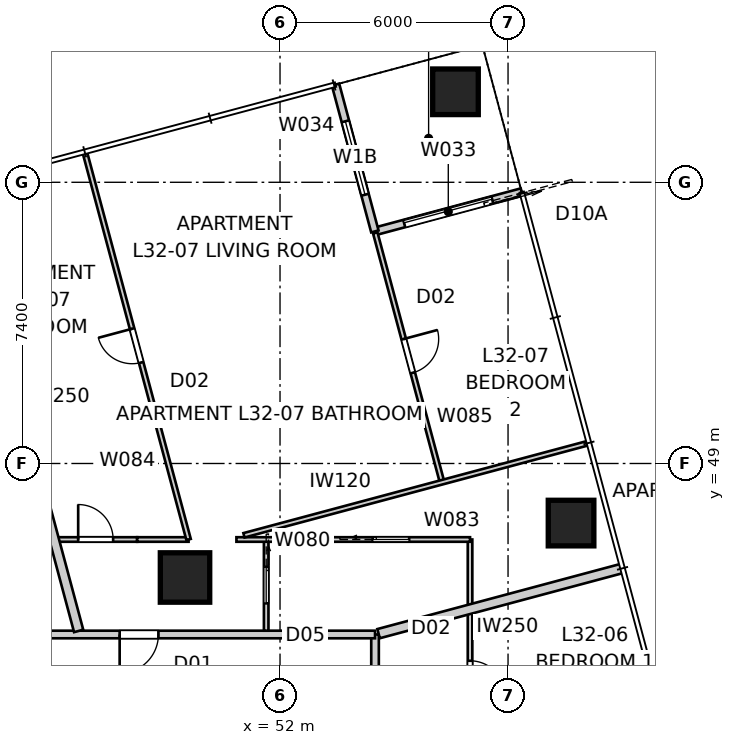
"""IFC4 building model, lengths in metres.
Left out: names, types, materials, properties, quantities, classifications, styles, units other than length and angle.
Written with IfcOpenShell. Run it as: python <this file> out.ifc"""

import sys

from ifc_helpers import new_model, si_unit, direction, frame, frame_2d, origin, origin_2d, place, context, subcontext, project, spatial, rectangle, extrude, element, fill, save


model = new_model("IFC4")
c1 = context("Model", 3, precision=1e-05, world=origin(), true_north=direction((0.0, 1.0)))
c2 = subcontext(c1, "Body", "Model", "MODEL_VIEW")
j1 = project(units=[si_unit("LENGTHUNIT", "METRE"), si_unit("PLANEANGLEUNIT", "RADIAN")], contexts=[c1])
p1 = place(None, origin())
s1 = spatial("IfcSite", under=j1, at=p1, CompositionType="ELEMENT")
p2 = place(p1, origin())
s2 = spatial("IfcBuilding", under=s1, at=p2, CompositionType="ELEMENT")
p3 = place(p2, frame((0.0, 0.0, 118.4)))
s3 = spatial("IfcBuildingStorey", under=s2, at=p3, CompositionType="ELEMENT", Elevation=118.4)
for number, where, z_axis, x_axis in (
    (1, (59.658, 47.432, 0.0), (0.0, 0.0, 1.0), (1.0, 0.0, 0.0)),
    (2, (56.617, 58.781, 0.0), (0.0, 0.0, 1.0), (1.0, 0.0, 0.0)),
):
    element("IfcColumn", number, at=place(p3, frame(where, z_axis=z_axis, x_axis=x_axis)), inside=s3, PredefinedType="COLUMN", context=c2, shape_type="SweptSolid", body=[
        extrude(rectangle(XDim=1.2, YDim=1.2, at=origin_2d()), origin(), (0.0, 0.0, 1.0), 3.4),
    ])
p4 = place(p3, frame((49.5, 46.0, 0.0), z_axis=(0.0, 0.0, 1.0), x_axis=(1.0, 0.0, 0.0)))
e3 = element("IfcColumn", 3, at=p4, inside=s3, PredefinedType="COLUMN", context=c2, shape_type="SweptSolid", body=[
    extrude(rectangle(XDim=1.3, YDim=1.3, at=origin_2d()), origin(), (0.0, 0.0, 1.0), 3.4),
])
p5 = place(p3, frame((58.359, 56.143, 0.0), z_axis=(0.0, 0.0, 1.0), x_axis=(-0.965919172068, -0.258843877716, 0.0)))
e4 = element("IfcWall", 4, at=p5, inside=s3, PredefinedType="SOLIDWALL", context=c2, shape_type="SweptSolid", body=[
    extrude(rectangle(XDim=4.0, YDim=0.2, at=frame_2d((2.0, 0.0))), origin(), (0.0, 0.0, 1.0), 3.25),
])
p6 = place(p5, frame((0.8, 0.0, 0.0)))
e5 = element("IfcOpeningElement", 5, at=p6, cuts=e4, PredefinedType="OPENING", context=c2, shape_type="SweptSolid", body=[
    extrude(rectangle(XDim=2.4, YDim=2.1, at=frame_2d((1.2, 1.05))), frame((0.0, 0.11, 0.0), z_axis=(0.0, -1.0, 0.0), x_axis=(1.0, 0.0, 0.0)), (0.0, 0.0, 1.0), 0.22),
])
p7 = place(p3, frame((54.496, 55.107, 0.0), z_axis=(0.0, 0.0, 1.0), x_axis=(-0.258786931944, 0.965934430412, 0.0)))
e6 = element("IfcWall", 6, at=p7, inside=s3, PredefinedType="SOLIDWALL", context=c2, shape_type="SweptSolid", body=[
    extrude(rectangle(XDim=4.0, YDim=0.2, at=frame_2d((2.0, 0.0))), origin(), (0.0, 0.0, 1.0), 3.25),
])
p8 = place(p7, frame((1.0, 0.0, 0.45)))
e7 = element("IfcOpeningElement", 7, at=p8, cuts=e6, PredefinedType="OPENING", context=c2, shape_type="SweptSolid", body=[
    extrude(rectangle(XDim=2.0, YDim=1.8, at=frame_2d((1.0, 0.9))), frame((0.0, 0.11, 0.0), z_axis=(0.0, -1.0, 0.0), x_axis=(1.0, 0.0, 0.0)), (0.0, 0.0, 1.0), 0.22),
])
p9 = place(p3, frame((54.5, 15.5, 0.0), z_axis=(0.0, 0.0, 1.0), x_axis=(0.0, 1.0, 0.0)))
e8 = element("IfcWall", 8, at=p9, inside=s3, PredefinedType="PARTITIONING", context=c2, shape_type="SweptSolid", body=[
    extrude(rectangle(XDim=29.0, YDim=0.2, at=frame_2d((14.5, 0.0))), origin(), (0.0, 0.0, 1.0), 3.25),
])
p10 = place(p9, frame((24.76, 0.0, 0.0)))
e9 = element("IfcOpeningElement", 9, at=p10, cuts=e8, PredefinedType="OPENING", context=c2, shape_type="SweptSolid", body=[
    extrude(rectangle(XDim=1.02, YDim=2.1, at=frame_2d((0.51, 1.05))), frame((0.0, 0.11, 0.0), z_axis=(0.0, -1.0, 0.0), x_axis=(1.0, 0.0, 0.0)), (0.0, 0.0, 1.0), 0.22),
])
p11 = place(p9, frame((5.829, 0.0, 0.0)))
e10 = element("IfcOpeningElement", 10, at=p11, cuts=e8, PredefinedType="OPENING", context=c2, shape_type="SweptSolid", body=[
    extrude(rectangle(XDim=1.02, YDim=2.34, at=frame_2d((0.51, 1.17))), frame((0.0, 0.11, 0.0), z_axis=(0.0, -1.0, 0.0), x_axis=(1.0, 0.0, 0.0)), (0.0, 0.0, 1.0), 0.22),
])
p12 = place(p9, frame((9.559, 0.0, 0.0)))
e11 = element("IfcOpeningElement", 11, at=p12, cuts=e8, PredefinedType="OPENING", context=c2, shape_type="SweptSolid", body=[
    extrude(rectangle(XDim=1.02, YDim=2.34, at=frame_2d((0.51, 1.17))), frame((0.0, 0.11, 0.0), z_axis=(0.0, -1.0, 0.0), x_axis=(1.0, 0.0, 0.0)), (0.0, 0.0, 1.0), 0.22),
])
p13 = place(p3, frame((54.5, 44.5, 0.0), z_axis=(0.0, 0.0, 1.0), x_axis=(-1.0, 0.0, 0.0)))
e12 = element("IfcWall", 12, at=p13, inside=s3, PredefinedType="PARTITIONING", context=c2, shape_type="SweptSolid", body=[
    extrude(rectangle(XDim=28.2, YDim=0.2, at=frame_2d((14.1, 0.0))), origin(), (0.0, 0.0, 1.0), 3.25),
])
p14 = place(p13, frame((10.837, 0.0, 0.0)))
e13 = element("IfcOpeningElement", 13, at=p14, cuts=e12, PredefinedType="OPENING", context=c2, shape_type="SweptSolid", body=[
    extrude(rectangle(XDim=1.02, YDim=2.34, at=frame_2d((0.51, 1.17))), frame((0.0, 0.11, 0.0), z_axis=(0.0, -1.0, 0.0), x_axis=(1.0, 0.0, 0.0)), (0.0, 0.0, 1.0), 0.22),
])
p15 = place(p13, frame((5.7, 0.0, 0.0)))
e14 = element("IfcOpeningElement", 14, at=p15, cuts=e12, PredefinedType="OPENING", context=c2, shape_type="SweptSolid", body=[
    extrude(rectangle(XDim=1.02, YDim=2.34, at=frame_2d((0.51, 1.17))), frame((0.0, 0.11, 0.0), z_axis=(0.0, -1.0, 0.0), x_axis=(1.0, 0.0, 0.0)), (0.0, 0.0, 1.0), 0.22),
])
p16 = place(p13, frame((26.127, 0.0, 0.0)))
e15 = element("IfcOpeningElement", 15, at=p16, cuts=e12, PredefinedType="OPENING", context=c2, shape_type="SweptSolid", body=[
    extrude(rectangle(XDim=1.02, YDim=2.34, at=frame_2d((0.51, 1.17))), frame((0.0, 0.11, 0.0), z_axis=(0.0, -1.0, 0.0), x_axis=(1.0, 0.0, 0.0)), (0.0, 0.0, 1.0), 0.22),
])
p17 = place(p3, frame((43.56, 56.318, 0.0), z_axis=(0.0, 0.0, 1.0), x_axis=(0.258824223352, -0.965924438766, 0.0)))
e16 = element("IfcWall", 16, at=p17, inside=s3, PredefinedType="PARTITIONING", context=c2, shape_type="SweptSolid", body=[
    extrude(rectangle(XDim=12.138, YDim=0.25, at=frame_2d((6.069, 0.0))), origin(), (0.0, 0.0, 1.0), 3.25),
])
p18 = place(p3, frame((61.012, 46.242, 0.0), z_axis=(0.0, 0.0, 1.0), x_axis=(-0.965929355837, -0.25880587229, 0.0)))
e17 = element("IfcWall", 17, at=p18, inside=s3, PredefinedType="PARTITIONING", context=c2, shape_type="SweptSolid", body=[
    extrude(rectangle(XDim=6.645, YDim=0.25, at=frame_2d((3.322, 0.0))), origin(), (0.0, 0.0, 1.0), 3.25),
])
p19 = place(p3, frame((57.0, 47.0, 0.0), z_axis=(0.0, 0.0, 1.0), x_axis=(0.0, -1.0, 0.0)))
e18 = element("IfcWall", 18, at=p19, inside=s3, PredefinedType="PARTITIONING", context=c2, shape_type="SweptSolid", body=[
    extrude(rectangle(XDim=34.0, YDim=0.12, at=frame_2d((17.0, 0.0))), origin(), (0.0, 0.0, 1.0), 2.55),
])
p20 = place(p19, frame((8.23, 0.0, 0.0)))
e19 = element("IfcOpeningElement", 19, at=p20, cuts=e18, PredefinedType="OPENING", context=c2, shape_type="SweptSolid", body=[
    extrude(rectangle(XDim=0.92, YDim=2.34, at=frame_2d((0.46, 1.17))), frame((0.0, 0.07, 0.0), z_axis=(0.0, -1.0, 0.0), x_axis=(1.0, 0.0, 0.0)), (0.0, 0.0, 1.0), 0.14),
])
p21 = place(p19, frame((3.192, 0.0, 0.0)))
e20 = element("IfcOpeningElement", 20, at=p21, cuts=e18, PredefinedType="OPENING", context=c2, shape_type="SweptSolid", body=[
    extrude(rectangle(XDim=0.92, YDim=2.34, at=frame_2d((0.46, 1.17))), frame((0.0, 0.07, 0.0), z_axis=(0.0, -1.0, 0.0), x_axis=(1.0, 0.0, 0.0)), (0.0, 0.0, 1.0), 0.14),
])
p22 = place(p19, frame((24.391, 0.0, 0.0)))
e21 = element("IfcOpeningElement", 21, at=p22, cuts=e18, PredefinedType="OPENING", context=c2, shape_type="SweptSolid", body=[
    extrude(rectangle(XDim=0.92, YDim=2.34, at=frame_2d((0.46, 1.17))), frame((0.0, 0.07, 0.0), z_axis=(0.0, -1.0, 0.0), x_axis=(1.0, 0.0, 0.0)), (0.0, 0.0, 1.0), 0.14),
])
p23 = place(p19, frame((21.702, 0.0, 0.0)))
e22 = element("IfcOpeningElement", 22, at=p23, cuts=e18, PredefinedType="OPENING", context=c2, shape_type="SweptSolid", body=[
    extrude(rectangle(XDim=0.92, YDim=2.34, at=frame_2d((0.46, 1.17))), frame((0.0, 0.07, 0.0), z_axis=(0.0, -1.0, 0.0), x_axis=(1.0, 0.0, 0.0)), (0.0, 0.0, 1.0), 0.14),
])
p24 = place(p19, frame((31.459, 0.0, 0.0)))
e23 = element("IfcOpeningElement", 23, at=p24, cuts=e18, PredefinedType="OPENING", context=c2, shape_type="SweptSolid", body=[
    extrude(rectangle(XDim=0.96, YDim=2.1, at=frame_2d((0.48, 1.05))), frame((0.0, 0.07, 0.0), z_axis=(0.0, -1.0, 0.0), x_axis=(1.0, 0.0, 0.0)), (0.0, 0.0, 1.0), 0.14),
])
p25 = place(p19, frame((13.759, 0.0, 0.0)))
e24 = element("IfcOpeningElement", 24, at=p25, cuts=e18, PredefinedType="OPENING", context=c2, shape_type="SweptSolid", body=[
    extrude(rectangle(XDim=0.96, YDim=2.1, at=frame_2d((0.48, 1.05))), frame((0.0, 0.07, 0.0), z_axis=(0.0, -1.0, 0.0), x_axis=(1.0, 0.0, 0.0)), (0.0, 0.0, 1.0), 0.14),
])
p26 = place(p3, frame((51.636, 47.0, 0.0), z_axis=(0.0, 0.0, 1.0), x_axis=(0.0, -1.0, 0.0)))
e25 = element("IfcWall", 25, at=p26, inside=s3, PredefinedType="PARTITIONING", context=c2, shape_type="SweptSolid", body=[
    extrude(rectangle(XDim=2.4, YDim=0.12, at=frame_2d((1.2, 0.0))), origin(), (0.0, 0.0, 1.0), 3.25),
])
p27 = place(p26, frame((0.72, 0.0, 0.0)))
e26 = element("IfcOpeningElement", 26, at=p27, cuts=e25, PredefinedType="OPENING", context=c2, shape_type="SweptSolid", body=[
    extrude(rectangle(XDim=0.96, YDim=2.1, at=frame_2d((0.48, 1.05))), frame((0.0, 0.07, 0.0), z_axis=(0.0, -1.0, 0.0), x_axis=(1.0, 0.0, 0.0)), (0.0, 0.0, 1.0), 0.14),
])
p28 = place(p3, frame((23.0, 47.0, 0.0), z_axis=(0.0, 0.0, 1.0), x_axis=(1.0, 0.0, 0.0)))
e27 = element("IfcWall", 27, at=p28, inside=s3, PredefinedType="PARTITIONING", context=c2, shape_type="SweptSolid", body=[
    extrude(rectangle(XDim=25.241, YDim=0.12, at=frame_2d((12.62, 0.0))), origin(), (0.0, 0.0, 1.0), 2.55),
])
p29 = place(p28, frame((21.702, 0.0, 0.0)))
e28 = element("IfcOpeningElement", 28, at=p29, cuts=e27, PredefinedType="OPENING", context=c2, shape_type="SweptSolid", body=[
    extrude(rectangle(XDim=0.92, YDim=2.34, at=frame_2d((0.46, 1.17))), frame((0.0, 0.07, 0.0), z_axis=(0.0, -1.0, 0.0), x_axis=(1.0, 0.0, 0.0)), (0.0, 0.0, 1.0), 0.14),
])
p30 = place(p28, frame((17.598, 0.0, 0.0)))
e29 = element("IfcOpeningElement", 29, at=p30, cuts=e27, PredefinedType="OPENING", context=c2, shape_type="SweptSolid", body=[
    extrude(rectangle(XDim=0.92, YDim=2.34, at=frame_2d((0.46, 1.17))), frame((0.0, 0.07, 0.0), z_axis=(0.0, -1.0, 0.0), x_axis=(1.0, 0.0, 0.0)), (0.0, 0.0, 1.0), 0.14),
])
p31 = place(p28, frame((23.689, 0.0, 0.0)))
e30 = element("IfcOpeningElement", 30, at=p31, cuts=e27, PredefinedType="OPENING", context=c2, shape_type="SweptSolid", body=[
    extrude(rectangle(XDim=0.92, YDim=2.34, at=frame_2d((0.46, 1.17))), frame((0.0, 0.07, 0.0), z_axis=(0.0, -1.0, 0.0), x_axis=(1.0, 0.0, 0.0)), (0.0, 0.0, 1.0), 0.14),
])
p32 = place(p28, frame((2.225, 0.0, 0.0)))
e31 = element("IfcOpeningElement", 31, at=p32, cuts=e27, PredefinedType="OPENING", context=c2, shape_type="SweptSolid", body=[
    extrude(rectangle(XDim=0.92, YDim=2.34, at=frame_2d((0.46, 1.17))), frame((0.0, 0.07, 0.0), z_axis=(0.0, -1.0, 0.0), x_axis=(1.0, 0.0, 0.0)), (0.0, 0.0, 1.0), 0.14),
])
p33 = place(p28, frame((13.709, 0.0, 0.0)))
e32 = element("IfcOpeningElement", 32, at=p33, cuts=e27, PredefinedType="OPENING", context=c2, shape_type="SweptSolid", body=[
    extrude(rectangle(XDim=0.96, YDim=2.1, at=frame_2d((0.48, 1.05))), frame((0.0, 0.07, 0.0), z_axis=(0.0, -1.0, 0.0), x_axis=(1.0, 0.0, 0.0)), (0.0, 0.0, 1.0), 0.14),
])
p34 = place(p3, frame((50.853, 47.0, 0.0), z_axis=(0.0, 0.0, 1.0), x_axis=(1.0, 0.0, 0.0)))
e33 = element("IfcWall", 33, at=p34, inside=s3, PredefinedType="PARTITIONING", context=c2, shape_type="SweptSolid", body=[
    extrude(rectangle(XDim=6.147, YDim=0.12, at=frame_2d((3.074, 0.0))), origin(), (0.0, 0.0, 1.0), 3.25),
])
p35 = place(p34, frame((3.585, 0.0, 0.0)))
e34 = element("IfcOpeningElement", 34, at=p35, cuts=e33, PredefinedType="OPENING", context=c2, shape_type="SweptSolid", body=[
    extrude(rectangle(XDim=0.96, YDim=2.1, at=frame_2d((0.48, 1.05))), frame((0.0, 0.07, 0.0), z_axis=(0.0, -1.0, 0.0), x_axis=(1.0, 0.0, 0.0)), (0.0, 0.0, 1.0), 0.14),
])
p36 = place(p3, frame((49.594, 47.0, 0.0), z_axis=(0.0, 0.0, 1.0), x_axis=(-0.258797552287, 0.965931585015, 0.0)))
e35 = element("IfcWall", 35, at=p36, inside=s3, PredefinedType="PARTITIONING", context=c2, shape_type="SweptSolid", body=[
    extrude(rectangle(XDim=10.522, YDim=0.12, at=frame_2d((5.261, 0.0))), origin(), (0.0, 0.0, 1.0), 2.722),
])
p37 = place(p36, frame((4.821, 0.0, 0.0)))
e36 = element("IfcOpeningElement", 36, at=p37, cuts=e35, PredefinedType="OPENING", context=c2, shape_type="SweptSolid", body=[
    extrude(rectangle(XDim=0.92, YDim=2.34, at=frame_2d((0.46, 1.17))), frame((0.0, 0.07, 0.0), z_axis=(0.0, -1.0, 0.0), x_axis=(1.0, 0.0, 0.0)), (0.0, 0.0, 1.0), 0.14),
])
p38 = place(p3, frame((54.506, 55.069, 0.0), z_axis=(0.0, 0.0, 1.0), x_axis=(0.258830095464, -0.965922865286, 0.0)))
e37 = element("IfcWall", 37, at=p38, inside=s3, PredefinedType="PARTITIONING", context=c2, shape_type="SweptSolid", body=[
    extrude(rectangle(XDim=6.793, YDim=0.12, at=frame_2d((3.396, 0.0))), origin(), (0.0, 0.0, 1.0), 3.25),
])
p39 = place(p38, frame((2.892, 0.0, 0.0)))
e38 = element("IfcOpeningElement", 38, at=p39, cuts=e37, PredefinedType="OPENING", context=c2, shape_type="SweptSolid", body=[
    extrude(rectangle(XDim=0.92, YDim=2.34, at=frame_2d((0.46, 1.17))), frame((0.0, 0.07, 0.0), z_axis=(0.0, -1.0, 0.0), x_axis=(1.0, 0.0, 0.0)), (0.0, 0.0, 1.0), 0.14),
])
p40 = place(p3, frame((60.089, 49.532, 0.0), z_axis=(0.0, 0.0, 1.0), x_axis=(-0.965927203676, -0.25881390457, 0.0)))
e39 = element("IfcWall", 39, at=p40, inside=s3, PredefinedType="PARTITIONING", context=c2, shape_type="SweptSolid", body=[
    extrude(rectangle(XDim=9.357, YDim=0.12, at=frame_2d((4.678, 0.0))), origin(), (0.0, 0.0, 1.0), 2.638),
])
p41 = place(p3, frame((48.241, 47.0, 0.0), z_axis=(0.0, 0.0, 1.0), x_axis=(1.0, 0.0, 0.0)))
e40 = element("IfcWall", 40, at=p41, inside=s3, PredefinedType="PARTITIONING", context=c2, shape_type="SweptSolid", body=[
    extrude(rectangle(XDim=1.353, YDim=0.12, at=frame_2d((0.676, 0.0))), origin(), (0.0, 0.0, 1.0), 3.25),
])
p42 = place(p6, origin())
e41 = element("IfcDoor", 41, at=p42, inside=s3, OperationType="SLIDING_TO_LEFT", PredefinedType="DOOR", context=c2, shape_type="SweptSolid", body=[
    extrude(rectangle(XDim=2.4, YDim=2.1, at=frame_2d((1.2, 1.05))), frame((0.0, 0.025, 0.0), z_axis=(0.0, -1.0, 0.0), x_axis=(1.0, 0.0, 0.0)), (0.0, 0.0, 1.0), 0.05),
])
fill(e5, e41)
p43 = place(p8, origin())
e42 = element("IfcWindow", 42, at=p43, inside=s3, PartitioningType="SINGLE_PANEL", PredefinedType="WINDOW", context=c2, shape_type="SweptSolid", body=[
    extrude(rectangle(XDim=2.0, YDim=1.8, at=frame_2d((1.0, 0.9))), frame((0.0, 0.03, 0.0), z_axis=(0.0, -1.0, 0.0), x_axis=(1.0, 0.0, 0.0)), (0.0, 0.0, 1.0), 0.06),
])
fill(e7, e42)
p44 = place(p15, origin())
e43 = element("IfcDoor", 43, at=p44, inside=s3, OperationType="SINGLE_SWING_RIGHT", PredefinedType="DOOR", context=c2, shape_type="SweptSolid", body=[
    extrude(rectangle(XDim=1.02, YDim=2.34, at=frame_2d((0.51, 1.17))), frame((0.0, 0.025, 0.0), z_axis=(0.0, -1.0, 0.0), x_axis=(1.0, 0.0, 0.0)), (0.0, 0.0, 1.0), 0.05),
])
fill(e14, e43)
p45 = place(p21, origin())
e44 = element("IfcDoor", 44, at=p45, inside=s3, OperationType="SINGLE_SWING_RIGHT", PredefinedType="DOOR", context=c2, shape_type="SweptSolid", body=[
    extrude(rectangle(XDim=0.92, YDim=2.34, at=frame_2d((0.46, 1.17))), frame((0.0, 0.025, 0.0), z_axis=(0.0, -1.0, 0.0), x_axis=(1.0, 0.0, 0.0)), (0.0, 0.0, 1.0), 0.05),
])
fill(e20, e44)
p46 = place(p27, origin())
e45 = element("IfcDoor", 45, at=p46, inside=s3, OperationType="SLIDING_TO_LEFT", PredefinedType="DOOR", context=c2, shape_type="SweptSolid", body=[
    extrude(rectangle(XDim=0.96, YDim=2.1, at=frame_2d((0.48, 1.05))), frame((0.0, 0.025, 0.0), z_axis=(0.0, -1.0, 0.0), x_axis=(1.0, 0.0, 0.0)), (0.0, 0.0, 1.0), 0.05),
])
fill(e26, e45)
p47 = place(p31, origin())
e46 = element("IfcDoor", 46, at=p47, inside=s3, OperationType="SINGLE_SWING_LEFT", PredefinedType="DOOR", context=c2, shape_type="SweptSolid", body=[
    extrude(rectangle(XDim=0.92, YDim=2.34, at=frame_2d((0.46, 1.17))), frame((0.0, 0.025, 0.0), z_axis=(0.0, -1.0, 0.0), x_axis=(1.0, 0.0, 0.0)), (0.0, 0.0, 1.0), 0.05),
])
fill(e30, e46)
p48 = place(p35, origin())
e47 = element("IfcDoor", 47, at=p48, inside=s3, OperationType="SLIDING_TO_LEFT", PredefinedType="DOOR", context=c2, shape_type="SweptSolid", body=[
    extrude(rectangle(XDim=0.96, YDim=2.1, at=frame_2d((0.48, 1.05))), frame((0.0, 0.025, 0.0), z_axis=(0.0, -1.0, 0.0), x_axis=(1.0, 0.0, 0.0)), (0.0, 0.0, 1.0), 0.05),
])
fill(e34, e47)
p49 = place(p37, origin())
e48 = element("IfcDoor", 48, at=p49, inside=s3, OperationType="SINGLE_SWING_RIGHT", PredefinedType="DOOR", context=c2, shape_type="SweptSolid", body=[
    extrude(rectangle(XDim=0.92, YDim=2.34, at=frame_2d((0.46, 1.17))), frame((0.0, 0.025, 0.0), z_axis=(0.0, -1.0, 0.0), x_axis=(1.0, 0.0, 0.0)), (0.0, 0.0, 1.0), 0.05),
])
fill(e36, e48)
p50 = place(p39, origin())
e49 = element("IfcDoor", 49, at=p50, inside=s3, OperationType="SINGLE_SWING_LEFT", PredefinedType="DOOR", context=c2, shape_type="SweptSolid", body=[
    extrude(rectangle(XDim=0.92, YDim=2.34, at=frame_2d((0.46, 1.17))), frame((0.0, 0.025, 0.0), z_axis=(0.0, -1.0, 0.0), x_axis=(1.0, 0.0, 0.0)), (0.0, 0.0, 1.0), 0.05),
])
fill(e38, e49)
save(model, sys.argv[1])
